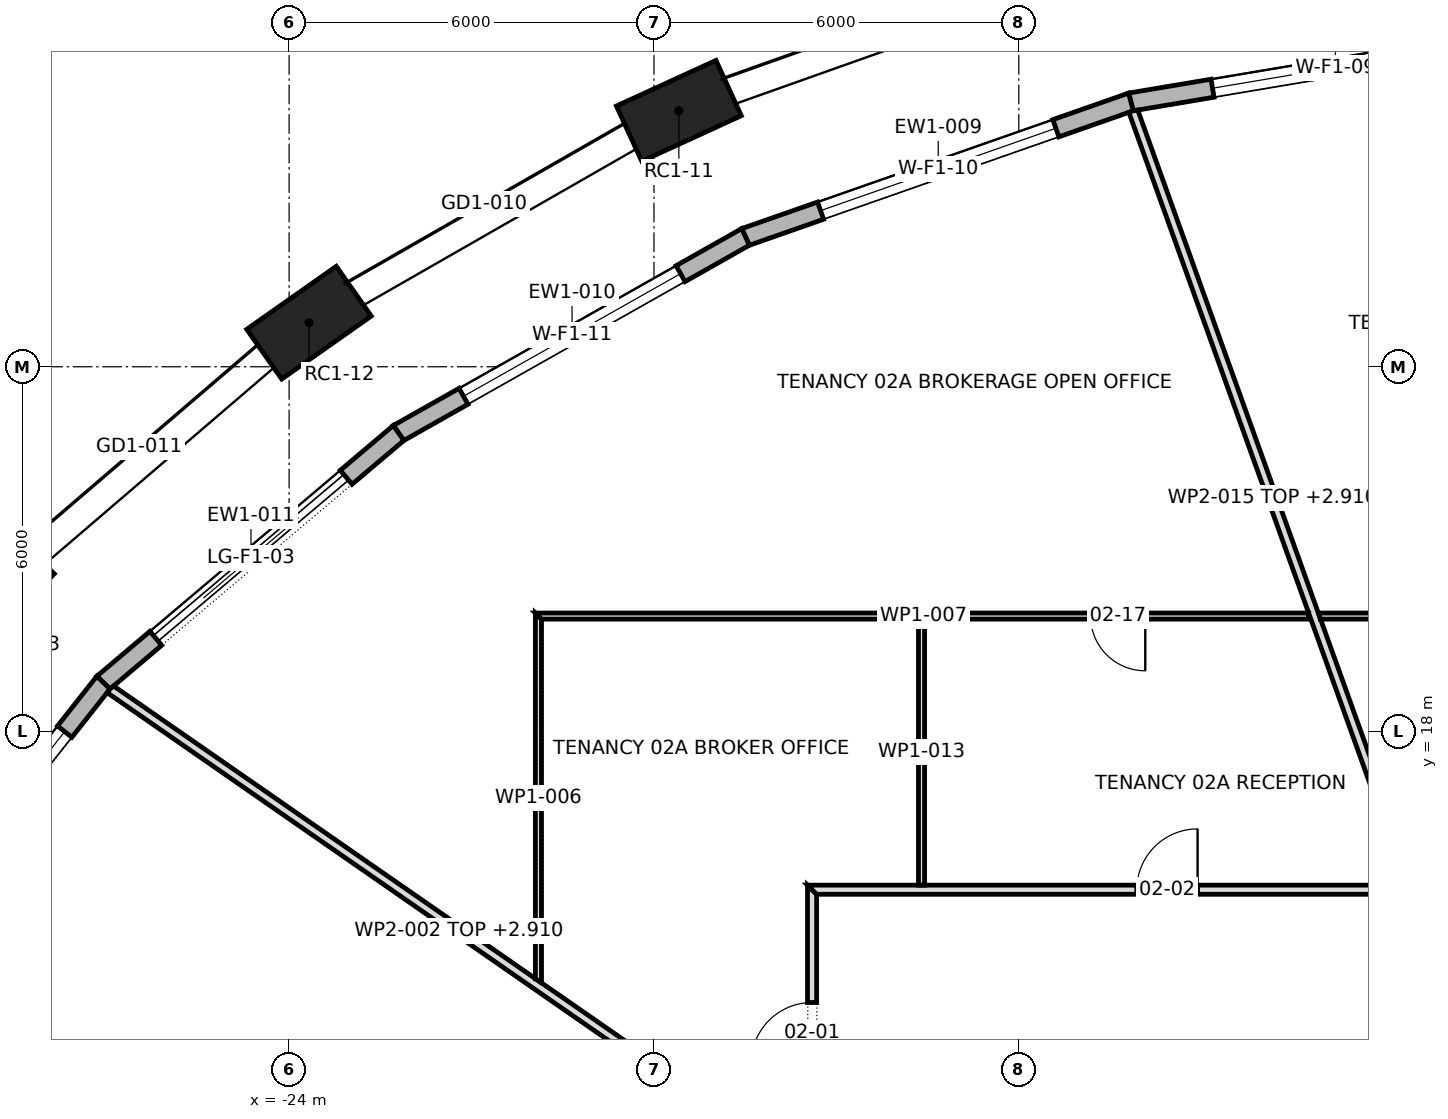
"""IFC4 building model, lengths in metres.
Left out: names, types, materials, properties, quantities, classifications, styles, units other than length and angle.
Written with IfcOpenShell. Run it as: python <this file> out.ifc"""

import sys

from ifc_helpers import new_model, si_unit, direction, frame, frame_2d, origin, origin_2d, place, context, subcontext, project, spatial, polyline, rectangle, outline, extrude, element, fill, save


model = new_model("IFC4")
c1 = context("Model", 3, precision=1e-05, world=origin(), true_north=direction((0.0, 1.0)))
c2 = subcontext(c1, "Body", "Model", "MODEL_VIEW")
j1 = project(units=[si_unit("LENGTHUNIT", "METRE"), si_unit("PLANEANGLEUNIT", "RADIAN")], contexts=[c1])
p1 = place(None, origin())
s1 = spatial("IfcSite", under=j1, at=p1, CompositionType="ELEMENT")
p2 = place(p1, origin())
s2 = spatial("IfcBuilding", under=s1, at=p2, CompositionType="ELEMENT")
p3 = place(p2, frame((0.0, 0.0, 44.5)))
s3 = spatial("IfcBuildingStorey", under=s2, at=p3, CompositionType="ELEMENT", Elevation=44.5)
for number, where, z_axis, x_axis in (
    (1, (-17.591, 28.208, 0.0), (0.0, 0.0, 1.0), (-0.909, -0.417, 0.0)),
    (2, (-23.673, 24.725, 0.0), (0.0, 0.0, 1.0), (-0.818, -0.575, 0.0)),
    (3, (-28.845, 20.291, 0.0), (0.0, 0.0, 1.0), (-0.692, -0.722, 0.0)),
):
    element("IfcColumn", number, at=place(p3, frame(where, z_axis=z_axis, x_axis=x_axis)), inside=s3, PredefinedType="COLUMN", context=c2, shape_type="SweptSolid", body=[
        extrude(rectangle(XDim=1.8, YDim=1.0, at=origin_2d()), origin(), (0.0, 0.0, 1.0), 4.2),
    ])
p4 = place(p3, frame((-3.429, 29.486, 0.0), z_axis=(0.0, 0.0, 1.0), x_axis=(-0.986145179906, -0.165884550659, 0.0)))
e4 = element("IfcWall", 4, at=p4, inside=s3, PredefinedType="STANDARD", context=c2, shape_type="SweptSolid", body=[
    extrude(outline(polyline([(-0.012, -0.15), (6.834, -0.15), (6.809, 0.15), (0.012, 0.15), (-0.012, -0.15)])), origin(), (0.0, 0.0, 1.0), 3.9),
])
p5 = place(p4, frame((1.361, 0.0, 0.6)))
e5 = element("IfcOpeningElement", 5, at=p5, cuts=e4, PredefinedType="OPENING", context=c2, shape_type="SweptSolid", body=[
    extrude(rectangle(XDim=4.1, YDim=2.85, at=frame_2d((2.05, 1.425))), frame((0.0, 0.162, 0.0), z_axis=(0.0, -1.0, 0.0), x_axis=(1.0, 0.0, 0.0)), (0.0, 0.0, 1.0), 0.324),
])
p6 = place(p3, frame((-10.156, 28.355, 0.0), z_axis=(0.0, 0.0, 1.0), x_axis=(-0.943778979427, -0.330577128657, 0.0)))
e6 = element("IfcWall", 6, at=p6, inside=s3, PredefinedType="STANDARD", context=c2, shape_type="SweptSolid", body=[
    extrude(outline(polyline([(-0.013, -0.15), (6.729, -0.15), (6.702, 0.15), (0.013, 0.15), (-0.013, -0.15)])), origin(), (0.0, 0.0, 1.0), 3.9),
])
p7 = place(p6, frame((1.308, 0.0, 0.6)))
e7 = element("IfcOpeningElement", 7, at=p7, cuts=e6, PredefinedType="OPENING", context=c2, shape_type="SweptSolid", body=[
    extrude(rectangle(XDim=4.1, YDim=2.85, at=frame_2d((2.05, 1.425))), frame((0.0, 0.162, 0.0), z_axis=(0.0, -1.0, 0.0), x_axis=(1.0, 0.0, 0.0)), (0.0, 0.0, 1.0), 0.324),
])
p8 = place(p3, frame((-16.494, 26.135, 0.0), z_axis=(0.0, 0.0, 1.0), x_axis=(-0.87061279013, -0.491968870623, 0.0)))
e8 = element("IfcWall", 8, at=p8, inside=s3, PredefinedType="STANDARD", context=c2, shape_type="SweptSolid", body=[
    extrude(outline(polyline([(-0.013, -0.15), (6.568, -0.15), (6.539, 0.15), (0.013, 0.15), (-0.013, -0.15)])), origin(), (0.0, 0.0, 1.0), 3.9),
])
p9 = place(p8, frame((1.227, 0.0, 0.6)))
e9 = element("IfcOpeningElement", 9, at=p9, cuts=e8, PredefinedType="OPENING", context=c2, shape_type="SweptSolid", body=[
    extrude(rectangle(XDim=4.1, YDim=2.85, at=frame_2d((2.05, 1.425))), frame((0.0, 0.162, 0.0), z_axis=(0.0, -1.0, 0.0), x_axis=(1.0, 0.0, 0.0)), (0.0, 0.0, 1.0), 0.324),
])
p10 = place(p3, frame((-22.2, 22.911, 0.0), z_axis=(0.0, 0.0, 1.0), x_axis=(-0.763577077796, -0.645716691951, 0.0)))
e10 = element("IfcWall", 10, at=p10, inside=s3, PredefinedType="STANDARD", context=c2, shape_type="SweptSolid", body=[
    extrude(outline(polyline([(-0.014, -0.15), (6.372, -0.15), (6.342, 0.15), (0.014, 0.15), (-0.014, -0.15)])), origin(), (0.0, 0.0, 1.0), 3.9),
])
p11 = place(p10, frame((1.129, 0.0, 0.0)))
e11 = element("IfcOpeningElement", 11, at=p11, cuts=e10, PredefinedType="OPENING", context=c2, shape_type="SweptSolid", body=[
    extrude(rectangle(XDim=4.1, YDim=3.45, at=frame_2d((2.05, 1.725))), frame((0.0, 0.162, 0.0), z_axis=(0.0, -1.0, 0.0), x_axis=(1.0, 0.0, 0.0)), (0.0, 0.0, 1.0), 0.324),
])
p12 = place(p3, frame((-27.054, 18.806, 0.0), z_axis=(0.0, 0.0, 1.0), x_axis=(-0.61992334328, -0.784662378642, 0.0)))
e12 = element("IfcWall", 12, at=p12, inside=s3, PredefinedType="STANDARD", context=c2, shape_type="SweptSolid", body=[
    extrude(outline(polyline([(-0.015, -0.15), (6.171, -0.15), (6.139, 0.15), (0.015, 0.15), (-0.015, -0.15)])), origin(), (0.0, 0.0, 1.0), 3.9),
])
p13 = place(p12, frame((1.027, 0.0, 0.6)))
e13 = element("IfcOpeningElement", 13, at=p13, cuts=e12, PredefinedType="OPENING", context=c2, shape_type="SweptSolid", body=[
    extrude(rectangle(XDim=4.1, YDim=2.85, at=frame_2d((2.05, 1.425))), frame((0.0, 0.162, 0.0), z_axis=(0.0, -1.0, 0.0), x_axis=(1.0, 0.0, 0.0)), (0.0, 0.0, 1.0), 0.324),
])
p14 = place(p3, frame((-26.949, 18.703, 0.0), z_axis=(0.0, 0.0, 1.0), x_axis=(0.821614916445, -0.570042918626, 0.0)))
e14 = element("IfcWall", 14, at=p14, inside=s3, PredefinedType="PARTITIONING", context=c2, shape_type="SweptSolid", body=[
    extrude(outline(polyline([(14.017, -0.075), (14.017, -0.074), (13.967, -0.002), (13.967, -0.002), (13.914, 0.075), (12.1, 0.075), (10.286, 0.075), (8.472, 0.075), (8.469, 0.073), (8.467, 0.075), (6.779, 0.075), (5.09, 0.075), (3.402, 0.075), (1.713, 0.075), (0.024, 0.075), (0.004, 0.0), (0.0, -0.071), (0.0, -0.075), (1.752, -0.075), (3.504, -0.075), (5.257, -0.075), (7.009, -0.075), (8.761, -0.075), (10.513, -0.075), (12.265, -0.075), (14.017, -0.075)])), origin(), (0.0, 0.0, 1.0), 2.91),
])
p15 = place(p3, frame((-19.9, 13.869, 0.0), z_axis=(0.0, 0.0, 1.0), x_axis=(0.0, 1.0, 0.0)))
e15 = element("IfcWall", 15, at=p15, inside=s3, PredefinedType="PARTITIONING", context=c2, shape_type="SweptSolid", body=[
    extrude(outline(polyline([(0.0, -0.05), (1.994, -0.05), (3.987, -0.05), (5.981, -0.05), (5.981, -0.05), (6.081, 0.05), (4.578, 0.05), (3.075, 0.05), (1.572, 0.05), (0.069, 0.05), (0.0, -0.05), (0.0, -0.05)])), origin(), (0.0, 0.0, 1.0), 3.9),
])
p16 = place(p3, frame((-19.95, 19.9, 0.0), z_axis=(0.0, 0.0, 1.0), x_axis=(1.0, 0.0, 0.0)))
e16 = element("IfcWall", 16, at=p16, inside=s3, PredefinedType="PARTITIONING", context=c2, shape_type="SweptSolid", body=[
    extrude(outline(polyline([(12.718, 0.05), (10.901, 0.05), (9.084, 0.05), (7.267, 0.05), (5.45, 0.05), (3.634, 0.05), (1.817, 0.05), (0.0, 0.05), (0.1, -0.05), (1.903, -0.05), (3.705, -0.05), (5.508, -0.05), (7.31, -0.05), (9.113, -0.05), (10.915, -0.05), (12.718, -0.05), (12.718, 0.05)])), origin(), (0.0, 0.0, 1.0), 3.9),
])
p17 = place(p16, frame((9.13, 0.0, 0.0)))
e17 = element("IfcOpeningElement", 17, at=p17, cuts=e16, PredefinedType="OPENING", context=c2, shape_type="SweptSolid", body=[
    extrude(rectangle(XDim=0.9, YDim=2.1, at=frame_2d((0.45, 1.05))), frame((0.0, 0.062, 0.0), z_axis=(0.0, -1.0, 0.0), x_axis=(1.0, 0.0, 0.0)), (0.0, 0.0, 1.0), 0.124),
])
p18 = place(p3, frame((-15.4, -15.475, 0.0), z_axis=(0.0, 0.0, 1.0), x_axis=(0.0, 1.0, 0.0)))
e18 = element("IfcWall", 18, at=p18, inside=s3, PredefinedType="PARTITIONING", context=c2, shape_type="SweptSolid", body=[
    extrude(outline(polyline([(0.15, -0.075), (2.066, -0.075), (3.981, -0.075), (5.897, -0.075), (7.812, -0.075), (9.728, -0.075), (11.644, -0.075), (13.56, -0.075), (15.475, -0.075), (17.391, -0.075), (19.306, -0.075), (21.222, -0.075), (23.138, -0.075), (25.053, -0.075), (26.969, -0.075), (28.885, -0.075), (30.8, -0.075), (30.95, 0.075), (29.016, 0.075), (27.081, 0.075), (25.147, 0.075), (23.212, 0.075), (21.278, 0.075), (19.344, 0.075), (17.409, 0.075), (15.475, 0.075), (13.541, 0.075), (11.606, 0.075), (9.672, 0.075), (7.738, 0.075), (5.803, 0.075), (3.869, 0.075), (1.935, 0.075), (0.0, 0.075), (0.15, -0.075)])), origin(), (0.0, 0.0, 1.0), 3.9),
])
p19 = place(p18, frame((28.02, 0.0, 0.0)))
e19 = element("IfcOpeningElement", 19, at=p19, cuts=e18, PredefinedType="OPENING", context=c2, shape_type="SweptSolid", body=[
    extrude(rectangle(XDim=1.0, YDim=2.1, at=frame_2d((0.5, 1.05))), frame((0.0, 0.087, 0.0), z_axis=(0.0, -1.0, 0.0), x_axis=(1.0, 0.0, 0.0)), (0.0, 0.0, 1.0), 0.174),
])
p20 = place(p18, frame((21.895, 0.0, 0.0)))
e20 = element("IfcOpeningElement", 20, at=p20, cuts=e18, PredefinedType="OPENING", context=c2, shape_type="SweptSolid", body=[
    extrude(rectangle(XDim=1.8, YDim=2.1, at=frame_2d((0.9, 1.05))), frame((0.0, 0.087, 0.0), z_axis=(0.0, -1.0, 0.0), x_axis=(1.0, 0.0, 0.0)), (0.0, 0.0, 1.0), 0.174),
])
p21 = place(p18, frame((15.798, 0.0, 0.0)))
e21 = element("IfcOpeningElement", 21, at=p21, cuts=e18, PredefinedType="OPENING", context=c2, shape_type="SweptSolid", body=[
    extrude(rectangle(XDim=1.8, YDim=2.1, at=frame_2d((0.9, 1.05))), frame((0.0, 0.087, 0.0), z_axis=(0.0, -1.0, 0.0), x_axis=(1.0, 0.0, 0.0)), (0.0, 0.0, 1.0), 0.174),
])
p22 = place(p18, frame((10.343, 0.0, 0.0)))
e22 = element("IfcOpeningElement", 22, at=p22, cuts=e18, PredefinedType="OPENING", context=c2, shape_type="SweptSolid", body=[
    extrude(rectangle(XDim=1.8, YDim=2.1, at=frame_2d((0.9, 1.05))), frame((0.0, 0.087, 0.0), z_axis=(0.0, -1.0, 0.0), x_axis=(1.0, 0.0, 0.0)), (0.0, 0.0, 1.0), 0.174),
])
p23 = place(p18, frame((3.795, 0.0, 0.0)))
e23 = element("IfcOpeningElement", 23, at=p23, cuts=e18, PredefinedType="OPENING", context=c2, shape_type="SweptSolid", body=[
    extrude(rectangle(XDim=1.0, YDim=2.1, at=frame_2d((0.5, 1.05))), frame((0.0, 0.087, 0.0), z_axis=(0.0, -1.0, 0.0), x_axis=(1.0, 0.0, 0.0)), (0.0, 0.0, 1.0), 0.174),
])
p24 = place(p3, frame((-15.475, 15.4, 0.0), z_axis=(0.0, 0.0, 1.0), x_axis=(1.0, 0.0, 0.0)))
e24 = element("IfcWall", 24, at=p24, inside=s3, PredefinedType="PARTITIONING", context=c2, shape_type="SweptSolid", body=[
    extrude(outline(polyline([(0.15, -0.075), (2.066, -0.075), (3.981, -0.075), (5.897, -0.075), (7.812, -0.075), (9.728, -0.075), (11.644, -0.075), (13.56, -0.075), (15.475, -0.075), (17.391, -0.075), (19.306, -0.075), (21.222, -0.075), (23.138, -0.075), (25.053, -0.075), (26.969, -0.075), (28.885, -0.075), (30.8, -0.075), (30.95, 0.075), (29.016, 0.075), (27.081, 0.075), (25.147, 0.075), (23.212, 0.075), (21.278, 0.075), (19.344, 0.075), (17.409, 0.075), (15.475, 0.075), (13.541, 0.075), (11.606, 0.075), (9.672, 0.075), (7.738, 0.075), (5.803, 0.075), (3.869, 0.075), (1.935, 0.075), (0.0, 0.075), (0.15, -0.075)])), origin(), (0.0, 0.0, 1.0), 3.9),
])
p25 = place(p24, frame((5.415, 0.0, 0.0)))
e25 = element("IfcOpeningElement", 25, at=p25, cuts=e24, PredefinedType="OPENING", context=c2, shape_type="SweptSolid", body=[
    extrude(rectangle(XDim=1.0, YDim=2.1, at=frame_2d((0.5, 1.05))), frame((0.0, 0.087, 0.0), z_axis=(0.0, -1.0, 0.0), x_axis=(1.0, 0.0, 0.0)), (0.0, 0.0, 1.0), 0.174),
])
p26 = place(p24, frame((25.435, 0.0, 0.0)))
e26 = element("IfcOpeningElement", 26, at=p26, cuts=e24, PredefinedType="OPENING", context=c2, shape_type="SweptSolid", body=[
    extrude(rectangle(XDim=1.0, YDim=2.1, at=frame_2d((0.5, 1.05))), frame((0.0, 0.087, 0.0), z_axis=(0.0, -1.0, 0.0), x_axis=(1.0, 0.0, 0.0)), (0.0, 0.0, 1.0), 0.174),
])
p27 = place(p24, frame((14.975, 0.0, 0.0)))
e27 = element("IfcOpeningElement", 27, at=p27, cuts=e24, PredefinedType="OPENING", context=c2, shape_type="SweptSolid", body=[
    extrude(rectangle(XDim=1.0, YDim=2.1, at=frame_2d((0.5, 1.05))), frame((0.0, 0.087, 0.0), z_axis=(0.0, -1.0, 0.0), x_axis=(1.0, 0.0, 0.0)), (0.0, 0.0, 1.0), 0.174),
])
p28 = place(p3, frame((-13.6, 19.85, 0.0), z_axis=(0.0, 0.0, 1.0), x_axis=(0.0, -1.0, 0.0)))
e28 = element("IfcWall", 28, at=p28, inside=s3, PredefinedType="PARTITIONING", context=c2, shape_type="SweptSolid", body=[
    extrude(rectangle(XDim=4.375, YDim=0.1, at=frame_2d((2.188, 0.0))), origin(), (0.0, 0.0, 1.0), 3.9),
])
p29 = place(p3, frame((-10.119, 28.209, 0.0), z_axis=(0.0, 0.0, 1.0), x_axis=(0.337949016046, -0.941164418448, 0.0)))
e29 = element("IfcWall", 29, at=p29, inside=s3, PredefinedType="PARTITIONING", context=c2, shape_type="SweptSolid", body=[
    extrude(outline(polyline([(0.0, -0.075), (1.75, -0.075), (3.5, -0.075), (5.249, -0.075), (6.999, -0.075), (8.749, -0.075), (8.749, -0.074), (8.751, -0.075), (10.335, -0.075), (11.919, -0.075), (13.503, -0.075), (13.555, 0.069), (13.555, 0.069), (13.557, 0.074), (13.557, 0.075), (12.008, 0.075), (10.458, 0.075), (8.909, 0.075), (8.908, 0.073), (8.903, 0.075), (7.125, 0.075), (5.347, 0.075), (3.57, 0.075), (1.792, 0.075), (0.014, 0.075), (0.0, 0.0), (0.0, -0.071), (0.0, -0.075)])), origin(), (0.0, 0.0, 1.0), 2.91),
])
p30 = place(p3, frame((-7.074, 19.9, 0.0), z_axis=(0.0, 0.0, 1.0), x_axis=(1.0, 0.0, 0.0)))
e30 = element("IfcWall", 30, at=p30, inside=s3, PredefinedType="PARTITIONING", context=c2, shape_type="SweptSolid", body=[
    extrude(outline(polyline([(0.036, -0.05), (1.795, -0.05), (3.555, -0.05), (5.314, -0.05), (7.074, -0.05), (8.833, -0.05), (10.593, -0.05), (12.353, -0.05), (14.112, -0.05), (14.148, 0.05), (14.148, 0.05), (12.379, 0.05), (10.611, 0.05), (8.843, 0.05), (7.074, 0.05), (5.305, 0.05), (3.537, 0.05), (1.769, 0.05), (0.0, 0.05), (0.0, 0.05), (0.036, -0.05)])), origin(), (0.0, 0.0, 1.0), 3.9),
])
p31 = place(p30, frame((6.624, 0.0, 0.0)))
e31 = element("IfcOpeningElement", 31, at=p31, cuts=e30, PredefinedType="OPENING", context=c2, shape_type="SweptSolid", body=[
    extrude(rectangle(XDim=0.9, YDim=2.1, at=frame_2d((0.45, 1.05))), frame((0.0, 0.062, 0.0), z_axis=(0.0, -1.0, 0.0), x_axis=(1.0, 0.0, 0.0)), (0.0, 0.0, 1.0), 0.124),
])
p32 = place(p5, origin())
e32 = element("IfcWindow", 32, at=p32, inside=s3, PartitioningType="TRIPLE_PANEL_VERTICAL", PredefinedType="WINDOW", context=c2, shape_type="SweptSolid", body=[
    extrude(rectangle(XDim=4.1, YDim=2.85, at=frame_2d((2.05, 1.425))), frame((0.0, 0.03, 0.0), z_axis=(0.0, -1.0, 0.0), x_axis=(1.0, 0.0, 0.0)), (0.0, 0.0, 1.0), 0.06),
])
fill(e5, e32)
p33 = place(p7, origin())
e33 = element("IfcWindow", 33, at=p33, inside=s3, PartitioningType="TRIPLE_PANEL_VERTICAL", PredefinedType="WINDOW", context=c2, shape_type="SweptSolid", body=[
    extrude(rectangle(XDim=4.1, YDim=2.85, at=frame_2d((2.05, 1.425))), frame((0.0, 0.03, 0.0), z_axis=(0.0, -1.0, 0.0), x_axis=(1.0, 0.0, 0.0)), (0.0, 0.0, 1.0), 0.06),
])
fill(e7, e33)
p34 = place(p9, origin())
e34 = element("IfcWindow", 34, at=p34, inside=s3, PartitioningType="TRIPLE_PANEL_VERTICAL", PredefinedType="WINDOW", context=c2, shape_type="SweptSolid", body=[
    extrude(rectangle(XDim=4.1, YDim=2.85, at=frame_2d((2.05, 1.425))), frame((0.0, 0.03, 0.0), z_axis=(0.0, -1.0, 0.0), x_axis=(1.0, 0.0, 0.0)), (0.0, 0.0, 1.0), 0.06),
])
fill(e9, e34)
p35 = place(p11, origin())
e35 = element("IfcDoor", 35, at=p35, inside=s3, OperationType="DOUBLE_DOOR_SLIDING", PredefinedType="DOOR", context=c2, shape_type="SweptSolid", body=[
    extrude(rectangle(XDim=4.1, YDim=3.45, at=frame_2d((2.05, 1.725))), frame((0.0, 0.025, 0.0), z_axis=(0.0, -1.0, 0.0), x_axis=(1.0, 0.0, 0.0)), (0.0, 0.0, 1.0), 0.05),
])
fill(e11, e35)
p36 = place(p13, origin())
e36 = element("IfcWindow", 36, at=p36, inside=s3, PartitioningType="TRIPLE_PANEL_VERTICAL", PredefinedType="WINDOW", context=c2, shape_type="SweptSolid", body=[
    extrude(rectangle(XDim=4.1, YDim=2.85, at=frame_2d((2.05, 1.425))), frame((0.0, 0.03, 0.0), z_axis=(0.0, -1.0, 0.0), x_axis=(1.0, 0.0, 0.0)), (0.0, 0.0, 1.0), 0.06),
])
fill(e13, e36)
p37 = place(p19, origin())
e37 = element("IfcDoor", 37, at=p37, inside=s3, OperationType="SINGLE_SWING_RIGHT", PredefinedType="DOOR", context=c2, shape_type="SweptSolid", body=[
    extrude(rectangle(XDim=1.0, YDim=2.1, at=frame_2d((0.5, 1.05))), frame((0.0, 0.025, 0.0), z_axis=(0.0, -1.0, 0.0), x_axis=(1.0, 0.0, 0.0)), (0.0, 0.0, 1.0), 0.05),
])
fill(e19, e37)
p38 = place(p25, origin())
e38 = element("IfcDoor", 38, at=p38, inside=s3, OperationType="SINGLE_SWING_LEFT", PredefinedType="DOOR", context=c2, shape_type="SweptSolid", body=[
    extrude(rectangle(XDim=1.0, YDim=2.1, at=frame_2d((0.5, 1.05))), frame((0.0, 0.025, 0.0), z_axis=(0.0, -1.0, 0.0), x_axis=(1.0, 0.0, 0.0)), (0.0, 0.0, 1.0), 0.05),
])
fill(e25, e38)
p39 = place(p17, frame((0.9, 0.0, 0.0), z_axis=(0.0, 0.0, 1.0), x_axis=(-1.0, 0.0, 0.0)))
e39 = element("IfcDoor", 39, at=p39, inside=s3, OperationType="SINGLE_SWING_RIGHT", PredefinedType="DOOR", context=c2, shape_type="SweptSolid", body=[
    extrude(rectangle(XDim=0.9, YDim=2.1, at=frame_2d((0.45, 1.05))), frame((0.0, 0.025, 0.0), z_axis=(0.0, -1.0, 0.0), x_axis=(1.0, 0.0, 0.0)), (0.0, 0.0, 1.0), 0.05),
])
fill(e17, e39)
save(model, sys.argv[1])
